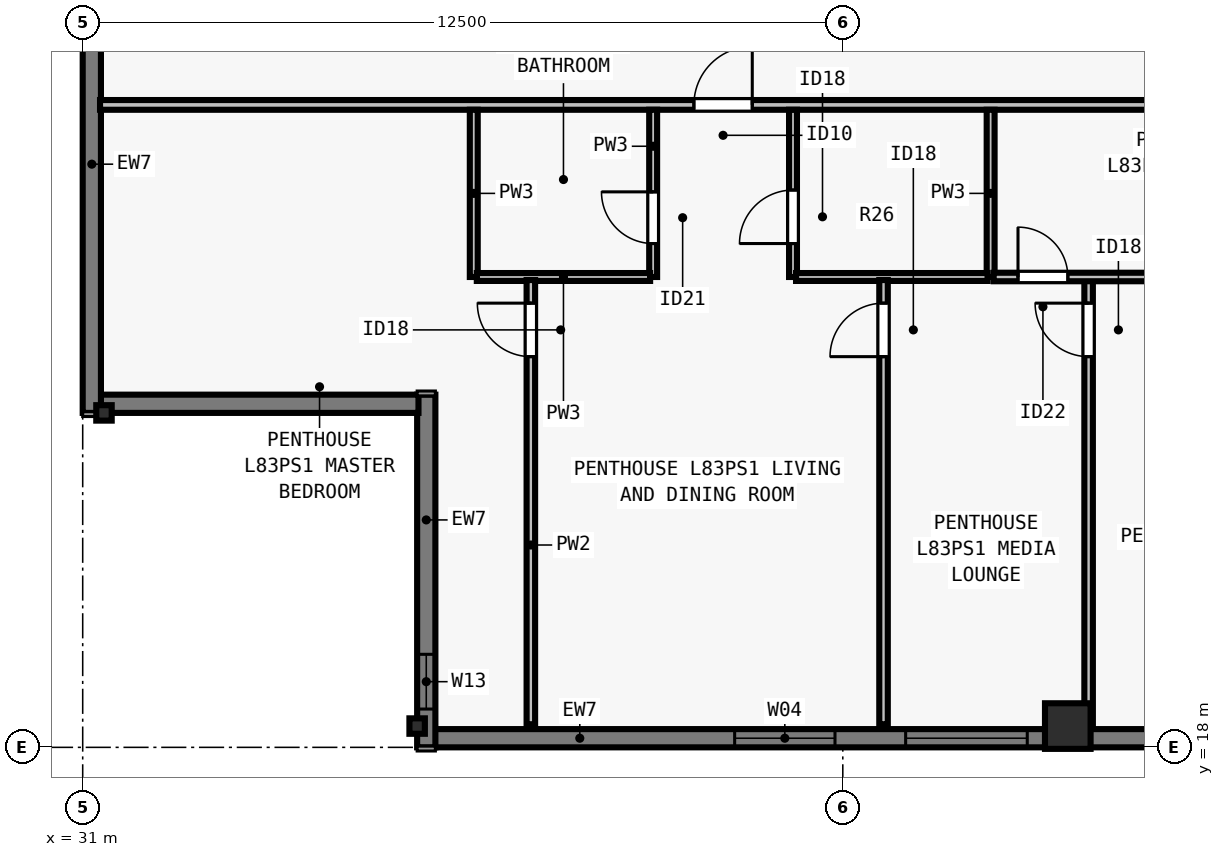
"""IFC4 building model, lengths in metres.
Left out: names, types, materials, properties, quantities, classifications, styles, units other than length and angle.
Written with IfcOpenShell. Run it as: python <this file> out.ifc"""

import sys

from ifc_helpers import new_model, si_unit, direction, frame, frame_2d, origin, origin_2d, place, context, subcontext, project, spatial, rectangle, i_section, extrude, element, fill, save


model = new_model("IFC4")
c1 = context("Model", 3, precision=1e-05, world=origin(), true_north=direction((0.0, 1.0)))
c2 = subcontext(c1, "Body", "Model", "MODEL_VIEW")
j1 = project(units=[si_unit("LENGTHUNIT", "METRE"), si_unit("PLANEANGLEUNIT", "RADIAN")], contexts=[c1])
p1 = place(None, origin())
s1 = spatial("IfcSite", under=j1, at=p1, CompositionType="ELEMENT")
p2 = place(p1, origin())
s2 = spatial("IfcBuilding", under=s1, at=p2, CompositionType="ELEMENT")
p3 = place(p2, frame((0.0, 0.0, 301.5)))
s3 = spatial("IfcBuildingStorey", under=s2, at=p3, CompositionType="ELEMENT", Elevation=301.5)
p4 = place(p3, frame((36.5, 18.35, 0.0), z_axis=(0.0, 0.0, 1.0), x_axis=(1.0, 0.0, 0.0)))
e1 = element("IfcColumn", 1, at=p4, inside=s3, PredefinedType="COLUMN", context=c2, shape_type="SweptSolid", body=[
    extrude(i_section(OverallWidth=0.254, OverallDepth=0.254, WebThickness=0.009, FlangeThickness=0.014, FilletRadius=0.013, at=origin_2d()), origin(), (0.0, 0.0, 1.0), 3.5),
])
p5 = place(p3, frame((47.2, 18.35, 0.0), z_axis=(0.0, 0.0, 1.0), x_axis=(1.0, 0.0, 0.0)))
e2 = element("IfcColumn", 2, at=p5, inside=s3, PredefinedType="COLUMN", context=c2, shape_type="SweptSolid", body=[
    extrude(rectangle(XDim=0.75, YDim=0.75, at=origin_2d()), origin(), (0.0, 0.0, 1.0), 3.5),
])
p6 = place(p3, frame((31.35, 23.5, 0.0), z_axis=(0.0, 0.0, 1.0), x_axis=(0.0, 1.0, 0.0)))
e3 = element("IfcColumn", 3, at=p6, inside=s3, PredefinedType="COLUMN", context=c2, shape_type="SweptSolid", body=[
    extrude(i_section(OverallWidth=0.254, OverallDepth=0.254, WebThickness=0.009, FlangeThickness=0.014, FilletRadius=0.013, at=origin_2d()), origin(), (0.0, 0.0, 1.0), 3.5),
])
p7 = place(p3, frame((67.5, 18.15, 0.0), z_axis=(0.0, 0.0, 1.0), x_axis=(-1.0, 0.0, 0.0)))
e4 = element("IfcWall", 4, at=p7, inside=s3, PredefinedType="SOLIDWALL", context=c2, shape_type="SweptSolid", body=[
    extrude(rectangle(XDim=30.722, YDim=0.3, at=frame_2d((15.361, 0.0))), origin(), (0.0, 0.0, 1.0), 3.29),
])
p8 = place(p7, frame((4.769, 0.0, 0.8)))
e5 = element("IfcOpeningElement", 5, at=p8, cuts=e4, PredefinedType="OPENING", context=c2, shape_type="SweptSolid", body=[
    extrude(rectangle(XDim=2.0, YDim=1.758, at=frame_2d((1.0, 0.879))), frame((0.0, 0.16, 0.0), z_axis=(0.0, -1.0, 0.0), x_axis=(1.0, 0.0, 0.0)), (0.0, 0.0, 1.0), 0.32),
])
p9 = place(p7, frame((8.331, 0.0, 0.8)))
e6 = element("IfcOpeningElement", 6, at=p9, cuts=e4, PredefinedType="OPENING", context=c2, shape_type="SweptSolid", body=[
    extrude(rectangle(XDim=1.65, YDim=1.758, at=frame_2d((0.825, 0.879))), frame((0.0, 0.16, 0.0), z_axis=(0.0, -1.0, 0.0), x_axis=(1.0, 0.0, 0.0)), (0.0, 0.0, 1.0), 0.32),
])
p10 = place(p7, frame((12.442, 0.0, 0.8)))
e7 = element("IfcOpeningElement", 7, at=p10, cuts=e4, PredefinedType="OPENING", context=c2, shape_type="SweptSolid", body=[
    extrude(rectangle(XDim=2.0, YDim=1.758, at=frame_2d((1.0, 0.879))), frame((0.0, 0.16, 0.0), z_axis=(0.0, -1.0, 0.0), x_axis=(1.0, 0.0, 0.0)), (0.0, 0.0, 1.0), 0.32),
])
p11 = place(p7, frame((16.455, 0.0, 0.8)))
e8 = element("IfcOpeningElement", 8, at=p11, cuts=e4, PredefinedType="OPENING", context=c2, shape_type="SweptSolid", body=[
    extrude(rectangle(XDim=1.65, YDim=1.758, at=frame_2d((0.825, 0.879))), frame((0.0, 0.16, 0.0), z_axis=(0.0, -1.0, 0.0), x_axis=(1.0, 0.0, 0.0)), (0.0, 0.0, 1.0), 0.32),
])
p12 = place(p7, frame((20.967, 0.0, 0.8)))
e9 = element("IfcOpeningElement", 9, at=p12, cuts=e4, PredefinedType="OPENING", context=c2, shape_type="SweptSolid", body=[
    extrude(rectangle(XDim=2.0, YDim=1.758, at=frame_2d((1.0, 0.879))), frame((0.0, 0.16, 0.0), z_axis=(0.0, -1.0, 0.0), x_axis=(1.0, 0.0, 0.0)), (0.0, 0.0, 1.0), 0.32),
])
p13 = place(p7, frame((24.128, 0.0, 0.8)))
e10 = element("IfcOpeningElement", 10, at=p13, cuts=e4, PredefinedType="OPENING", context=c2, shape_type="SweptSolid", body=[
    extrude(rectangle(XDim=1.65, YDim=1.758, at=frame_2d((0.825, 0.879))), frame((0.0, 0.16, 0.0), z_axis=(0.0, -1.0, 0.0), x_axis=(1.0, 0.0, 0.0)), (0.0, 0.0, 1.0), 0.32),
])
p14 = place(p3, frame((36.65, 18.0, 0.0), z_axis=(0.0, 0.0, 1.0), x_axis=(0.0, 1.0, 0.0)))
e11 = element("IfcWall", 11, at=p14, inside=s3, PredefinedType="SOLIDWALL", context=c2, shape_type="SweptSolid", body=[
    extrude(rectangle(XDim=5.8, YDim=0.3, at=frame_2d((2.9, 0.0))), origin(), (0.0, 0.0, 1.0), 3.29),
])
p15 = place(p14, frame((0.63, 0.0, 0.8)))
e12 = element("IfcOpeningElement", 12, at=p15, cuts=e11, PredefinedType="OPENING", context=c2, shape_type="SweptSolid", body=[
    extrude(rectangle(XDim=0.9, YDim=1.75, at=frame_2d((0.45, 0.875))), frame((0.0, 0.16, 0.0), z_axis=(0.0, -1.0, 0.0), x_axis=(1.0, 0.0, 0.0)), (0.0, 0.0, 1.0), 0.32),
])
p16 = place(p3, frame((36.522, 23.65, 0.0), z_axis=(0.0, 0.0, 1.0), x_axis=(-1.0, 0.0, 0.0)))
e13 = element("IfcWall", 13, at=p16, inside=s3, PredefinedType="SOLIDWALL", context=c2, shape_type="SweptSolid", body=[
    extrude(rectangle(XDim=5.244, YDim=0.3, at=frame_2d((2.622, 0.0))), origin(), (0.0, 0.0, 1.0), 3.29),
])
p17 = place(p3, frame((31.15, 23.5, 0.0), z_axis=(0.0, 0.0, 1.0), x_axis=(0.0, 1.0, 0.0)))
e14 = element("IfcWall", 14, at=p17, inside=s3, PredefinedType="SOLIDWALL", context=c2, shape_type="SweptSolid", body=[
    extrude(rectangle(XDim=30.722, YDim=0.3, at=frame_2d((15.361, 0.0))), origin(), (0.0, 0.0, 1.0), 3.29),
])
p18 = place(p17, frame((8.331, 0.0, 0.8)))
e15 = element("IfcOpeningElement", 15, at=p18, cuts=e14, PredefinedType="OPENING", context=c2, shape_type="SweptSolid", body=[
    extrude(rectangle(XDim=1.65, YDim=1.758, at=frame_2d((0.825, 0.879))), frame((0.0, 0.16, 0.0), z_axis=(0.0, -1.0, 0.0), x_axis=(1.0, 0.0, 0.0)), (0.0, 0.0, 1.0), 0.32),
])
p19 = place(p17, frame((12.442, 0.0, 0.8)))
e16 = element("IfcOpeningElement", 16, at=p19, cuts=e14, PredefinedType="OPENING", context=c2, shape_type="SweptSolid", body=[
    extrude(rectangle(XDim=2.0, YDim=1.758, at=frame_2d((1.0, 0.879))), frame((0.0, 0.16, 0.0), z_axis=(0.0, -1.0, 0.0), x_axis=(1.0, 0.0, 0.0)), (0.0, 0.0, 1.0), 0.32),
])
p20 = place(p17, frame((16.455, 0.0, 0.8)))
e17 = element("IfcOpeningElement", 17, at=p20, cuts=e14, PredefinedType="OPENING", context=c2, shape_type="SweptSolid", body=[
    extrude(rectangle(XDim=1.65, YDim=1.758, at=frame_2d((0.825, 0.879))), frame((0.0, 0.16, 0.0), z_axis=(0.0, -1.0, 0.0), x_axis=(1.0, 0.0, 0.0)), (0.0, 0.0, 1.0), 0.32),
])
p21 = place(p17, frame((20.967, 0.0, 0.8)))
e18 = element("IfcOpeningElement", 18, at=p21, cuts=e14, PredefinedType="OPENING", context=c2, shape_type="SweptSolid", body=[
    extrude(rectangle(XDim=2.0, YDim=1.758, at=frame_2d((1.0, 0.879))), frame((0.0, 0.16, 0.0), z_axis=(0.0, -1.0, 0.0), x_axis=(1.0, 0.0, 0.0)), (0.0, 0.0, 1.0), 0.32),
])
p22 = place(p3, frame((31.285, 28.565, 0.0), z_axis=(0.0, 0.0, 1.0), x_axis=(1.0, 0.0, 0.0)))
e19 = element("IfcWall", 19, at=p22, inside=s3, PredefinedType="PARTITIONING", context=c2, shape_type="SweptSolid", body=[
    extrude(rectangle(XDim=41.43, YDim=0.16, at=frame_2d((20.715, 0.0))), origin(), (0.0, 0.0, 1.0), 3.009),
])
p23 = place(p22, frame((9.766, 0.0, 0.0)))
e20 = element("IfcOpeningElement", 20, at=p23, cuts=e19, PredefinedType="OPENING", context=c2, shape_type="SweptSolid", body=[
    extrude(rectangle(XDim=0.96, YDim=2.18, at=frame_2d((0.48, 1.09))), frame((0.0, 0.09, 0.0), z_axis=(0.0, -1.0, 0.0), x_axis=(1.0, 0.0, 0.0)), (0.0, 0.0, 1.0), 0.18),
])
p24 = place(p22, frame((30.346, 0.0, 0.0)))
e21 = element("IfcOpeningElement", 21, at=p24, cuts=e19, PredefinedType="OPENING", context=c2, shape_type="SweptSolid", body=[
    extrude(rectangle(XDim=0.96, YDim=2.18, at=frame_2d((0.48, 1.09))), frame((0.0, 0.09, 0.0), z_axis=(0.0, -1.0, 0.0), x_axis=(1.0, 0.0, 0.0)), (0.0, 0.0, 1.0), 0.18),
])
p25 = place(p3, frame((37.431, 25.735, 0.0), z_axis=(0.0, 0.0, 1.0), x_axis=(0.0, 1.0, 0.0)))
e22 = element("IfcWall", 22, at=p25, inside=s3, PredefinedType="PLUMBINGWALL", context=c2, shape_type="SweptSolid", body=[
    extrude(rectangle(XDim=2.75, YDim=0.13, at=frame_2d((1.375, 0.0))), origin(), (0.0, 0.0, 1.0), 3.29),
])
p26 = place(p3, frame((40.381, 25.735, 0.0), z_axis=(0.0, 0.0, 1.0), x_axis=(0.0, 1.0, 0.0)))
e23 = element("IfcWall", 23, at=p26, inside=s3, PredefinedType="PLUMBINGWALL", context=c2, shape_type="SweptSolid", body=[
    extrude(rectangle(XDim=2.75, YDim=0.13, at=frame_2d((1.375, 0.0))), origin(), (0.0, 0.0, 1.0), 3.29),
])
p27 = place(p26, frame((0.55, 0.0, 0.0)))
e24 = element("IfcOpeningElement", 24, at=p27, cuts=e23, PredefinedType="OPENING", context=c2, shape_type="SweptSolid", body=[
    extrude(rectangle(XDim=0.85, YDim=2.08, at=frame_2d((0.425, 1.04))), frame((0.0, 0.075, 0.0), z_axis=(0.0, -1.0, 0.0), x_axis=(1.0, 0.0, 0.0)), (0.0, 0.0, 1.0), 0.15),
])
p28 = place(p3, frame((37.481, 25.735, 0.0), z_axis=(0.0, 0.0, 1.0), x_axis=(1.0, 0.0, 0.0)))
e25 = element("IfcWall", 25, at=p28, inside=s3, PredefinedType="PLUMBINGWALL", context=c2, shape_type="SweptSolid", body=[
    extrude(rectangle(XDim=2.85, YDim=0.13, at=frame_2d((1.425, 0.0))), origin(), (0.0, 0.0, 1.0), 3.29),
])
p29 = place(p3, frame((45.931, 25.735, 0.0), z_axis=(0.0, 0.0, 1.0), x_axis=(0.0, 1.0, 0.0)))
e26 = element("IfcWall", 26, at=p29, inside=s3, PredefinedType="PLUMBINGWALL", context=c2, shape_type="SweptSolid", body=[
    extrude(rectangle(XDim=2.75, YDim=0.13, at=frame_2d((1.375, 0.0))), origin(), (0.0, 0.0, 1.0), 3.29),
])
p30 = place(p3, frame((42.681, 25.735, 0.0), z_axis=(0.0, 0.0, 1.0), x_axis=(0.0, 1.0, 0.0)))
e27 = element("IfcWall", 27, at=p30, inside=s3, PredefinedType="PLUMBINGWALL", context=c2, shape_type="SweptSolid", body=[
    extrude(rectangle(XDim=2.75, YDim=0.13, at=frame_2d((1.375, 0.0))), origin(), (0.0, 0.0, 1.0), 3.29),
])
p31 = place(p30, frame((0.55, 0.0, 0.0)))
e28 = element("IfcOpeningElement", 28, at=p31, cuts=e27, PredefinedType="OPENING", context=c2, shape_type="SweptSolid", body=[
    extrude(rectangle(XDim=0.88, YDim=2.1, at=frame_2d((0.44, 1.05))), frame((0.0, 0.075, 0.0), z_axis=(0.0, -1.0, 0.0), x_axis=(1.0, 0.0, 0.0)), (0.0, 0.0, 1.0), 0.15),
])
p32 = place(p3, frame((42.731, 25.735, 0.0), z_axis=(0.0, 0.0, 1.0), x_axis=(1.0, 0.0, 0.0)))
e29 = element("IfcWall", 29, at=p32, inside=s3, PredefinedType="PLUMBINGWALL", context=c2, shape_type="SweptSolid", body=[
    extrude(rectangle(XDim=3.15, YDim=0.13, at=frame_2d((1.575, 0.0))), origin(), (0.0, 0.0, 1.0), 3.29),
])
p33 = place(p3, frame((38.37, 18.38, 0.0), z_axis=(0.0, 0.0, 1.0), x_axis=(0.0, 1.0, 0.0)))
e30 = element("IfcWall", 30, at=p33, inside=s3, PredefinedType="PARTITIONING", context=c2, shape_type="SweptSolid", body=[
    extrude(rectangle(XDim=7.305, YDim=0.14, at=frame_2d((3.653, 0.0))), origin(), (0.0, 0.0, 1.0), 2.653),
])
p34 = place(p33, frame((6.045, 0.0, 0.0)))
e31 = element("IfcOpeningElement", 31, at=p34, cuts=e30, PredefinedType="OPENING", context=c2, shape_type="SweptSolid", body=[
    extrude(rectangle(XDim=0.88, YDim=2.1, at=frame_2d((0.44, 1.05))), frame((0.0, 0.08, 0.0), z_axis=(0.0, -1.0, 0.0), x_axis=(1.0, 0.0, 0.0)), (0.0, 0.0, 1.0), 0.16),
])
p35 = place(p3, frame((47.542, 18.38, 0.0), z_axis=(0.0, 0.0, 1.0), x_axis=(0.0, 1.0, 0.0)))
e32 = element("IfcWall", 32, at=p35, inside=s3, PredefinedType="PARTITIONING", context=c2, shape_type="SweptSolid", body=[
    extrude(rectangle(XDim=7.395, YDim=0.14, at=frame_2d((3.698, 0.0))), origin(), (0.0, 0.0, 1.0), 3.009),
])
p36 = place(p35, frame((6.045, 0.0, 0.0)))
e33 = element("IfcOpeningElement", 33, at=p36, cuts=e32, PredefinedType="OPENING", context=c2, shape_type="SweptSolid", body=[
    extrude(rectangle(XDim=0.88, YDim=2.1, at=frame_2d((0.44, 1.05))), frame((0.0, 0.08, 0.0), z_axis=(0.0, -1.0, 0.0), x_axis=(1.0, 0.0, 0.0)), (0.0, 0.0, 1.0), 0.16),
])
p37 = place(p3, frame((45.981, 25.735, 0.0), z_axis=(0.0, 0.0, 1.0), x_axis=(1.0, 0.0, 0.0)))
e34 = element("IfcWall", 34, at=p37, inside=s3, PredefinedType="PARTITIONING", context=c2, shape_type="SweptSolid", body=[
    extrude(rectangle(XDim=5.711, YDim=0.14, at=frame_2d((2.855, 0.0))), origin(), (0.0, 0.0, 1.0), 3.29),
])
p38 = place(p37, frame((0.4, 0.0, 0.0)))
e35 = element("IfcOpeningElement", 35, at=p38, cuts=e34, PredefinedType="OPENING", context=c2, shape_type="SweptSolid", body=[
    extrude(rectangle(XDim=0.82, YDim=2.1, at=frame_2d((0.41, 1.05))), frame((0.0, 0.08, 0.0), z_axis=(0.0, -1.0, 0.0), x_axis=(1.0, 0.0, 0.0)), (0.0, 0.0, 1.0), 0.16),
])
p39 = place(p3, frame((44.17, 18.38, 0.0), z_axis=(0.0, 0.0, 1.0), x_axis=(0.0, 1.0, 0.0)))
e36 = element("IfcWall", 36, at=p39, inside=s3, PredefinedType="PARTITIONING", context=c2, shape_type="SweptSolid", body=[
    extrude(rectangle(XDim=7.305, YDim=0.14, at=frame_2d((3.653, 0.0))), origin(), (0.0, 0.0, 1.0), 3.29),
])
p40 = place(p39, frame((6.045, 0.0, 0.0)))
e37 = element("IfcOpeningElement", 37, at=p40, cuts=e36, PredefinedType="OPENING", context=c2, shape_type="SweptSolid", body=[
    extrude(rectangle(XDim=0.88, YDim=2.1, at=frame_2d((0.44, 1.05))), frame((0.0, 0.08, 0.0), z_axis=(0.0, -1.0, 0.0), x_axis=(1.0, 0.0, 0.0)), (0.0, 0.0, 1.0), 0.16),
])
p41 = place(p12, origin())
e38 = element("IfcWindow", 38, at=p41, inside=s3, PartitioningType="SINGLE_PANEL", PredefinedType="WINDOW", context=c2, shape_type="SweptSolid", body=[
    extrude(rectangle(XDim=2.0, YDim=1.758, at=frame_2d((1.0, 0.879))), frame((0.0, -0.05, 0.0), z_axis=(0.0, -1.0, 0.0), x_axis=(1.0, 0.0, 0.0)), (0.0, 0.0, 1.0), 0.06),
])
fill(e9, e38)
p42 = place(p13, origin())
e39 = element("IfcWindow", 39, at=p42, inside=s3, PartitioningType="SINGLE_PANEL", PredefinedType="WINDOW", context=c2, shape_type="SweptSolid", body=[
    extrude(rectangle(XDim=1.65, YDim=1.758, at=frame_2d((0.825, 0.879))), frame((0.0, -0.05, 0.0), z_axis=(0.0, -1.0, 0.0), x_axis=(1.0, 0.0, 0.0)), (0.0, 0.0, 1.0), 0.06),
])
fill(e10, e39)
p43 = place(p15, origin())
e40 = element("IfcWindow", 40, at=p43, inside=s3, PartitioningType="SINGLE_PANEL", PredefinedType="WINDOW", context=c2, shape_type="SweptSolid", body=[
    extrude(rectangle(XDim=0.9, YDim=1.75, at=frame_2d((0.45, 0.875))), frame((0.0, -0.04, 0.0), z_axis=(0.0, -1.0, 0.0), x_axis=(1.0, 0.0, 0.0)), (0.0, 0.0, 1.0), 0.06),
])
fill(e12, e40)
p44 = place(p27, origin())
e41 = element("IfcDoor", 41, at=p44, inside=s3, OperationType="SINGLE_SWING_RIGHT", PredefinedType="DOOR", context=c2, shape_type="SweptSolid", body=[
    extrude(rectangle(XDim=0.85, YDim=2.08, at=frame_2d((0.425, 1.04))), frame((0.0, 0.025, 0.0), z_axis=(0.0, -1.0, 0.0), x_axis=(1.0, 0.0, 0.0)), (0.0, 0.0, 1.0), 0.05),
])
fill(e24, e41)
p45 = place(p31, origin())
e42 = element("IfcDoor", 42, at=p45, inside=s3, OperationType="SINGLE_SWING_LEFT", PredefinedType="DOOR", context=c2, shape_type="SweptSolid", body=[
    extrude(rectangle(XDim=0.88, YDim=2.1, at=frame_2d((0.44, 1.05))), frame((0.0, 0.025, 0.0), z_axis=(0.0, -1.0, 0.0), x_axis=(1.0, 0.0, 0.0)), (0.0, 0.0, 1.0), 0.05),
])
fill(e28, e42)
p46 = place(p34, origin())
e43 = element("IfcDoor", 43, at=p46, inside=s3, OperationType="SINGLE_SWING_RIGHT", PredefinedType="DOOR", context=c2, shape_type="SweptSolid", body=[
    extrude(rectangle(XDim=0.88, YDim=2.1, at=frame_2d((0.44, 1.05))), frame((0.0, 0.025, 0.0), z_axis=(0.0, -1.0, 0.0), x_axis=(1.0, 0.0, 0.0)), (0.0, 0.0, 1.0), 0.05),
])
fill(e31, e43)
p47 = place(p38, origin())
e44 = element("IfcDoor", 44, at=p47, inside=s3, OperationType="SINGLE_SWING_LEFT", PredefinedType="DOOR", context=c2, shape_type="SweptSolid", body=[
    extrude(rectangle(XDim=0.82, YDim=2.1, at=frame_2d((0.41, 1.05))), frame((0.0, 0.025, 0.0), z_axis=(0.0, -1.0, 0.0), x_axis=(1.0, 0.0, 0.0)), (0.0, 0.0, 1.0), 0.05),
])
fill(e35, e44)
p48 = place(p36, origin())
e45 = element("IfcDoor", 45, at=p48, inside=s3, OperationType="SINGLE_SWING_RIGHT", PredefinedType="DOOR", context=c2, shape_type="SweptSolid", body=[
    extrude(rectangle(XDim=0.88, YDim=2.1, at=frame_2d((0.44, 1.05))), frame((0.0, 0.025, 0.0), z_axis=(0.0, -1.0, 0.0), x_axis=(1.0, 0.0, 0.0)), (0.0, 0.0, 1.0), 0.05),
])
fill(e33, e45)
p49 = place(p40, origin())
e46 = element("IfcDoor", 46, at=p49, inside=s3, OperationType="SINGLE_SWING_LEFT", PredefinedType="DOOR", context=c2, shape_type="SweptSolid", body=[
    extrude(rectangle(XDim=0.88, YDim=2.1, at=frame_2d((0.44, 1.05))), frame((0.0, 0.025, 0.0), z_axis=(0.0, -1.0, 0.0), x_axis=(1.0, 0.0, 0.0)), (0.0, 0.0, 1.0), 0.05),
])
fill(e37, e46)
p50 = place(p23, origin())
e47 = element("IfcDoor", 47, at=p50, inside=s3, OperationType="SINGLE_SWING_RIGHT", PredefinedType="DOOR", context=c2, shape_type="SweptSolid", body=[
    extrude(rectangle(XDim=0.96, YDim=2.18, at=frame_2d((0.48, 1.09))), frame((0.0, 0.025, 0.0), z_axis=(0.0, -1.0, 0.0), x_axis=(1.0, 0.0, 0.0)), (0.0, 0.0, 1.0), 0.05),
])
fill(e20, e47)
save(model, sys.argv[1])
